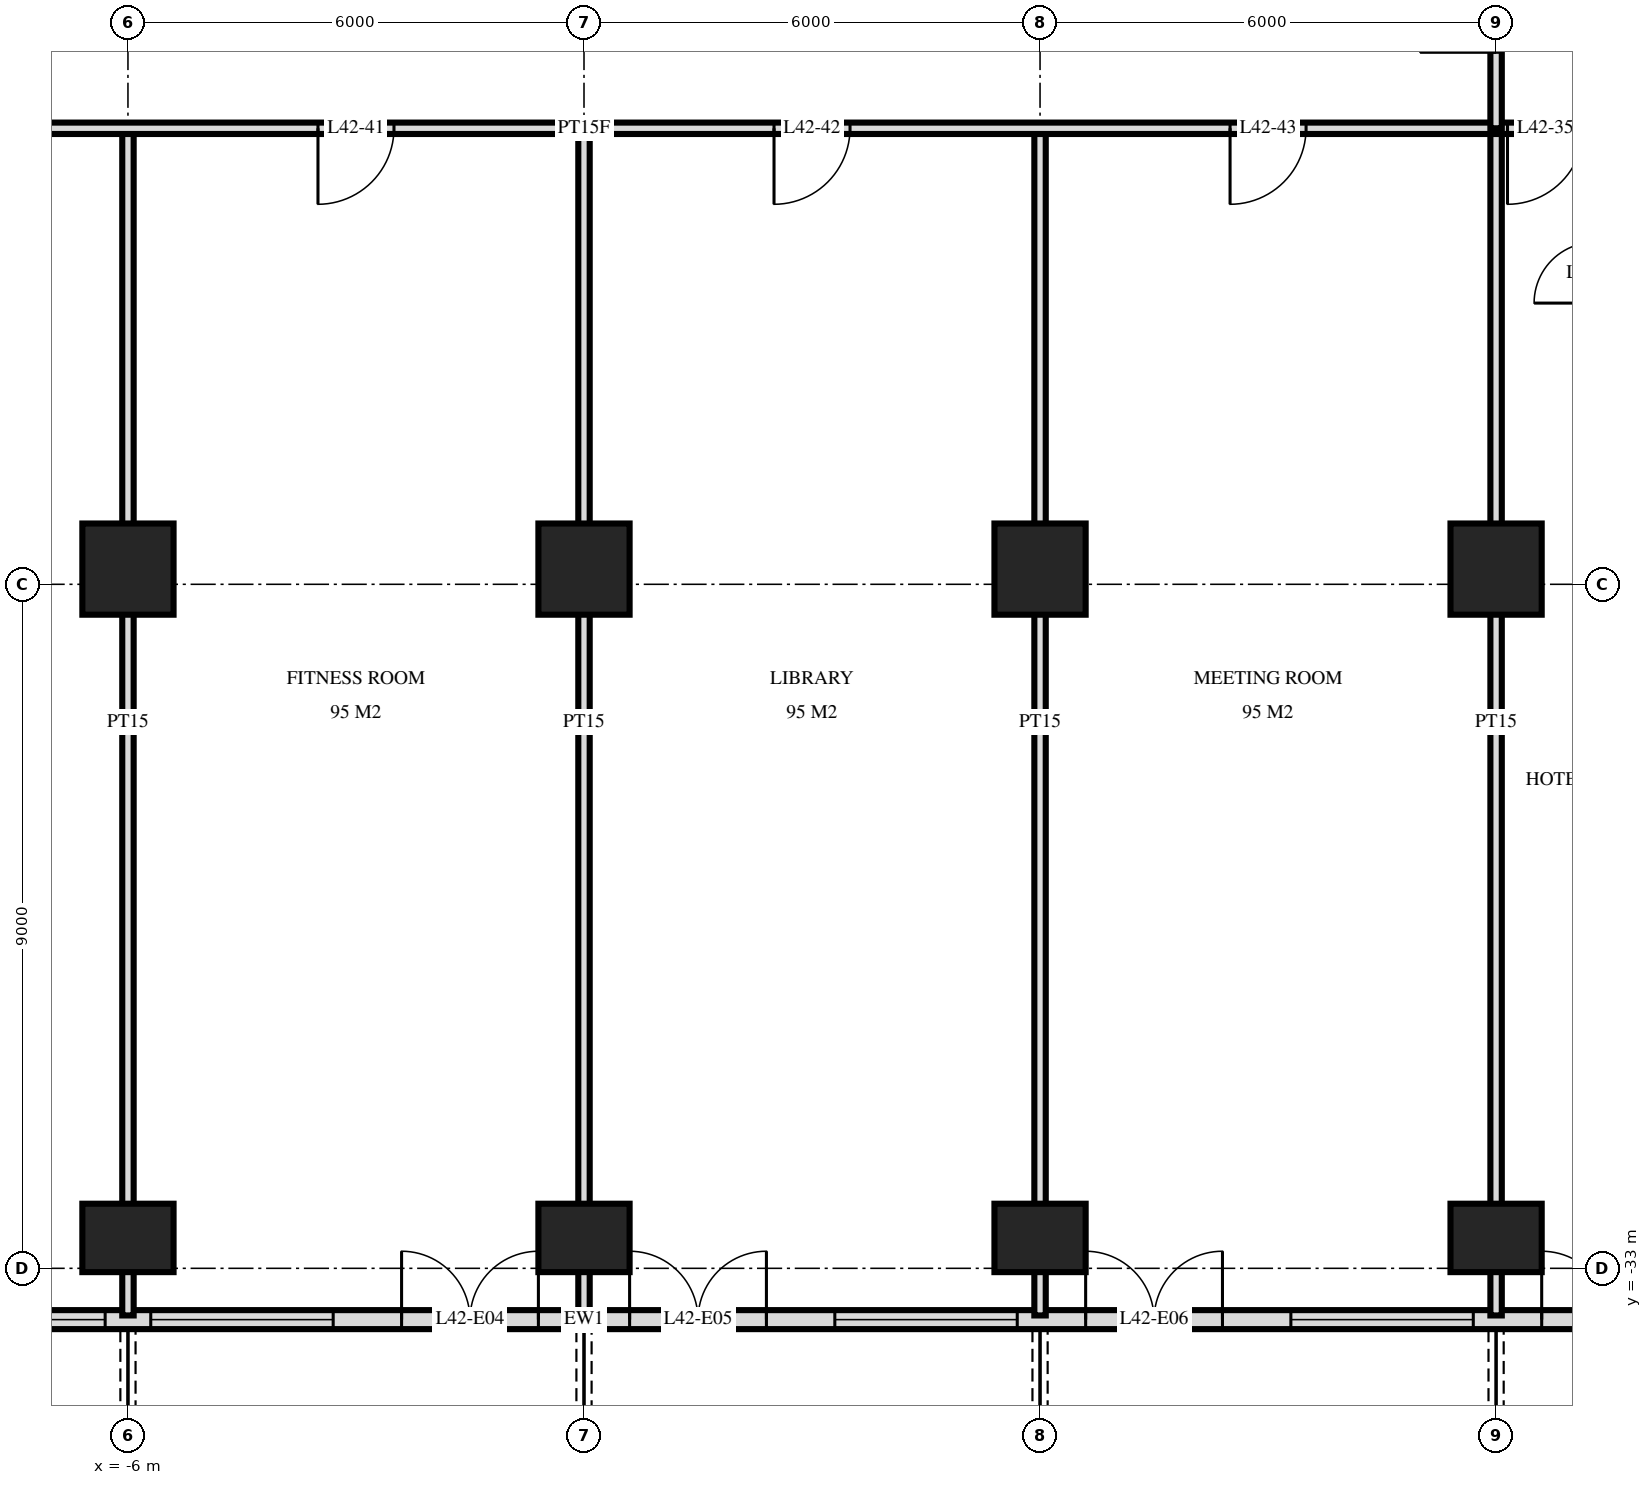
"""IFC4 building model, lengths in metres.
Left out: names, types, materials, properties, quantities, classifications, styles, units other than length and angle.
Written with IfcOpenShell. Run it as: python <this file> out.ifc"""

import sys

from ifc_helpers import new_model, si_unit, direction, frame, frame_2d, origin, origin_2d, place, context, subcontext, project, spatial, rectangle, extrude, element, fill, save


model = new_model("IFC4")
c1 = context("Model", 3, precision=1e-05, world=origin(), true_north=direction((0.0, 1.0)))
c2 = subcontext(c1, "Body", "Model", "MODEL_VIEW")
j1 = project(units=[si_unit("LENGTHUNIT", "METRE"), si_unit("PLANEANGLEUNIT", "RADIAN")], contexts=[c1])
p1 = place(None, origin())
s1 = spatial("IfcSite", under=j1, at=p1, CompositionType="ELEMENT")
p2 = place(p1, origin())
s2 = spatial("IfcBuilding", under=s1, at=p2, CompositionType="ELEMENT")
p3 = place(p2, frame((0.0, 0.0, 163.2)))
s3 = spatial("IfcBuildingStorey", under=s2, at=p3, CompositionType="ELEMENT", Elevation=163.2)
p4 = place(p3, frame((-6.0, -32.6, 0.0), z_axis=(0.0, 0.0, 1.0), x_axis=(1.0, 0.0, 0.0)))
e1 = element("IfcColumn", 1, at=p4, inside=s3, PredefinedType="COLUMN", context=c2, shape_type="SweptSolid", body=[
    extrude(rectangle(XDim=1.2, YDim=0.9, at=origin_2d()), origin(), (0.0, 0.0, 1.0), 3.6),
])
p5 = place(p3, frame((-6.0, -23.8, 0.0), z_axis=(0.0, 0.0, 1.0), x_axis=(1.0, 0.0, 0.0)))
e2 = element("IfcColumn", 2, at=p5, inside=s3, PredefinedType="COLUMN", context=c2, shape_type="SweptSolid", body=[
    extrude(rectangle(XDim=1.2, YDim=1.2, at=origin_2d()), origin(), (0.0, 0.0, 1.0), 3.6),
])
p6 = place(p3, frame((0.0, -32.6, 0.0), z_axis=(0.0, 0.0, 1.0), x_axis=(1.0, 0.0, 0.0)))
e3 = element("IfcColumn", 3, at=p6, inside=s3, PredefinedType="COLUMN", context=c2, shape_type="SweptSolid", body=[
    extrude(rectangle(XDim=1.2, YDim=0.9, at=origin_2d()), origin(), (0.0, 0.0, 1.0), 3.6),
])
p7 = place(p3, frame((0.0, -23.8, 0.0), z_axis=(0.0, 0.0, 1.0), x_axis=(1.0, 0.0, 0.0)))
e4 = element("IfcColumn", 4, at=p7, inside=s3, PredefinedType="COLUMN", context=c2, shape_type="SweptSolid", body=[
    extrude(rectangle(XDim=1.2, YDim=1.2, at=origin_2d()), origin(), (0.0, 0.0, 1.0), 3.6),
])
p8 = place(p3, frame((6.0, -32.6, 0.0), z_axis=(0.0, 0.0, 1.0), x_axis=(1.0, 0.0, 0.0)))
e5 = element("IfcColumn", 5, at=p8, inside=s3, PredefinedType="COLUMN", context=c2, shape_type="SweptSolid", body=[
    extrude(rectangle(XDim=1.2, YDim=0.9, at=origin_2d()), origin(), (0.0, 0.0, 1.0), 3.6),
])
p9 = place(p3, frame((6.0, -23.8, 0.0), z_axis=(0.0, 0.0, 1.0), x_axis=(1.0, 0.0, 0.0)))
e6 = element("IfcColumn", 6, at=p9, inside=s3, PredefinedType="COLUMN", context=c2, shape_type="SweptSolid", body=[
    extrude(rectangle(XDim=1.2, YDim=1.2, at=origin_2d()), origin(), (0.0, 0.0, 1.0), 3.6),
])
p10 = place(p3, frame((12.0, -32.6, 0.0), z_axis=(0.0, 0.0, 1.0), x_axis=(1.0, 0.0, 0.0)))
e7 = element("IfcColumn", 7, at=p10, inside=s3, PredefinedType="COLUMN", context=c2, shape_type="SweptSolid", body=[
    extrude(rectangle(XDim=1.2, YDim=0.9, at=origin_2d()), origin(), (0.0, 0.0, 1.0), 3.6),
])
p11 = place(p3, frame((12.0, -23.8, 0.0), z_axis=(0.0, 0.0, 1.0), x_axis=(1.0, 0.0, 0.0)))
e8 = element("IfcColumn", 8, at=p11, inside=s3, PredefinedType="COLUMN", context=c2, shape_type="SweptSolid", body=[
    extrude(rectangle(XDim=1.2, YDim=1.2, at=origin_2d()), origin(), (0.0, 0.0, 1.0), 3.6),
])
p12 = place(p3, frame((-23.675, -33.675, 0.0), z_axis=(0.0, 0.0, 1.0), x_axis=(1.0, 0.0, 0.0)))
e9 = element("IfcWall", 9, at=p12, inside=s3, PredefinedType="SOLIDWALL", context=c2, shape_type="SweptSolid", body=[
    extrude(rectangle(XDim=47.351, YDim=0.25, at=frame_2d((23.675, 0.0))), origin(), (0.0, 0.0, 1.0), 3.32),
])
p13 = place(p12, frame((0.575, 0.0, 0.0)))
e10 = element("IfcOpeningElement", 10, at=p13, cuts=e9, PredefinedType="OPENING", context=c2, shape_type="SweptSolid", body=[
    extrude(rectangle(XDim=1.8, YDim=2.4, at=frame_2d((0.9, 1.2))), frame((0.0, 0.135, 0.0), z_axis=(0.0, -1.0, 0.0), x_axis=(1.0, 0.0, 0.0)), (0.0, 0.0, 1.0), 0.27),
])
p14 = place(p12, frame((3.425, 0.0, 0.3)))
e11 = element("IfcOpeningElement", 11, at=p14, cuts=e9, PredefinedType="OPENING", context=c2, shape_type="SweptSolid", body=[
    extrude(rectangle(XDim=1.8, YDim=2.1, at=frame_2d((0.9, 1.05))), frame((0.0, 0.135, 0.0), z_axis=(0.0, -1.0, 0.0), x_axis=(1.0, 0.0, 0.0)), (0.0, 0.0, 1.0), 0.27),
])
p15 = place(p12, frame((5.975, 0.0, 0.3)))
e12 = element("IfcOpeningElement", 12, at=p15, cuts=e9, PredefinedType="OPENING", context=c2, shape_type="SweptSolid", body=[
    extrude(rectangle(XDim=2.4, YDim=2.1, at=frame_2d((1.2, 1.05))), frame((0.0, 0.135, 0.0), z_axis=(0.0, -1.0, 0.0), x_axis=(1.0, 0.0, 0.0)), (0.0, 0.0, 1.0), 0.27),
])
p16 = place(p12, frame((9.275, 0.0, 0.0)))
e13 = element("IfcOpeningElement", 13, at=p16, cuts=e9, PredefinedType="OPENING", context=c2, shape_type="SweptSolid", body=[
    extrude(rectangle(XDim=1.8, YDim=2.4, at=frame_2d((0.9, 1.2))), frame((0.0, 0.135, 0.0), z_axis=(0.0, -1.0, 0.0), x_axis=(1.0, 0.0, 0.0)), (0.0, 0.0, 1.0), 0.27),
])
p17 = place(p12, frame((12.275, 0.0, 0.0)))
e14 = element("IfcOpeningElement", 14, at=p17, cuts=e9, PredefinedType="OPENING", context=c2, shape_type="SweptSolid", body=[
    extrude(rectangle(XDim=1.8, YDim=2.4, at=frame_2d((0.9, 1.2))), frame((0.0, 0.135, 0.0), z_axis=(0.0, -1.0, 0.0), x_axis=(1.0, 0.0, 0.0)), (0.0, 0.0, 1.0), 0.27),
])
p18 = place(p12, frame((14.975, 0.0, 0.3)))
e15 = element("IfcOpeningElement", 15, at=p18, cuts=e9, PredefinedType="OPENING", context=c2, shape_type="SweptSolid", body=[
    extrude(rectangle(XDim=2.4, YDim=2.1, at=frame_2d((1.2, 1.05))), frame((0.0, 0.135, 0.0), z_axis=(0.0, -1.0, 0.0), x_axis=(1.0, 0.0, 0.0)), (0.0, 0.0, 1.0), 0.27),
])
p19 = place(p12, frame((17.975, 0.0, 0.3)))
e16 = element("IfcOpeningElement", 16, at=p19, cuts=e9, PredefinedType="OPENING", context=c2, shape_type="SweptSolid", body=[
    extrude(rectangle(XDim=2.4, YDim=2.1, at=frame_2d((1.2, 1.05))), frame((0.0, 0.135, 0.0), z_axis=(0.0, -1.0, 0.0), x_axis=(1.0, 0.0, 0.0)), (0.0, 0.0, 1.0), 0.27),
])
p20 = place(p12, frame((21.275, 0.0, 0.0)))
e17 = element("IfcOpeningElement", 17, at=p20, cuts=e9, PredefinedType="OPENING", context=c2, shape_type="SweptSolid", body=[
    extrude(rectangle(XDim=1.8, YDim=2.4, at=frame_2d((0.9, 1.2))), frame((0.0, 0.135, 0.0), z_axis=(0.0, -1.0, 0.0), x_axis=(1.0, 0.0, 0.0)), (0.0, 0.0, 1.0), 0.27),
])
p21 = place(p12, frame((24.275, 0.0, 0.0)))
e18 = element("IfcOpeningElement", 18, at=p21, cuts=e9, PredefinedType="OPENING", context=c2, shape_type="SweptSolid", body=[
    extrude(rectangle(XDim=1.8, YDim=2.4, at=frame_2d((0.9, 1.2))), frame((0.0, 0.135, 0.0), z_axis=(0.0, -1.0, 0.0), x_axis=(1.0, 0.0, 0.0)), (0.0, 0.0, 1.0), 0.27),
])
p22 = place(p12, frame((26.975, 0.0, 0.3)))
e19 = element("IfcOpeningElement", 19, at=p22, cuts=e9, PredefinedType="OPENING", context=c2, shape_type="SweptSolid", body=[
    extrude(rectangle(XDim=2.4, YDim=2.1, at=frame_2d((1.2, 1.05))), frame((0.0, 0.135, 0.0), z_axis=(0.0, -1.0, 0.0), x_axis=(1.0, 0.0, 0.0)), (0.0, 0.0, 1.0), 0.27),
])
p23 = place(p12, frame((30.275, 0.0, 0.0)))
e20 = element("IfcOpeningElement", 20, at=p23, cuts=e9, PredefinedType="OPENING", context=c2, shape_type="SweptSolid", body=[
    extrude(rectangle(XDim=1.8, YDim=2.4, at=frame_2d((0.9, 1.2))), frame((0.0, 0.135, 0.0), z_axis=(0.0, -1.0, 0.0), x_axis=(1.0, 0.0, 0.0)), (0.0, 0.0, 1.0), 0.27),
])
p24 = place(p12, frame((32.975, 0.0, 0.3)))
e21 = element("IfcOpeningElement", 21, at=p24, cuts=e9, PredefinedType="OPENING", context=c2, shape_type="SweptSolid", body=[
    extrude(rectangle(XDim=2.4, YDim=2.1, at=frame_2d((1.2, 1.05))), frame((0.0, 0.135, 0.0), z_axis=(0.0, -1.0, 0.0), x_axis=(1.0, 0.0, 0.0)), (0.0, 0.0, 1.0), 0.27),
])
p25 = place(p12, frame((36.275, 0.0, 0.0)))
e22 = element("IfcOpeningElement", 22, at=p25, cuts=e9, PredefinedType="OPENING", context=c2, shape_type="SweptSolid", body=[
    extrude(rectangle(XDim=1.8, YDim=2.4, at=frame_2d((0.9, 1.2))), frame((0.0, 0.135, 0.0), z_axis=(0.0, -1.0, 0.0), x_axis=(1.0, 0.0, 0.0)), (0.0, 0.0, 1.0), 0.27),
])
p26 = place(p12, frame((38.975, 0.0, 0.3)))
e23 = element("IfcOpeningElement", 23, at=p26, cuts=e9, PredefinedType="OPENING", context=c2, shape_type="SweptSolid", body=[
    extrude(rectangle(XDim=2.4, YDim=2.1, at=frame_2d((1.2, 1.05))), frame((0.0, 0.135, 0.0), z_axis=(0.0, -1.0, 0.0), x_axis=(1.0, 0.0, 0.0)), (0.0, 0.0, 1.0), 0.27),
])
p27 = place(p12, frame((41.975, 0.0, 0.3)))
e24 = element("IfcOpeningElement", 24, at=p27, cuts=e9, PredefinedType="OPENING", context=c2, shape_type="SweptSolid", body=[
    extrude(rectangle(XDim=2.4, YDim=2.1, at=frame_2d((1.2, 1.05))), frame((0.0, 0.135, 0.0), z_axis=(0.0, -1.0, 0.0), x_axis=(1.0, 0.0, 0.0)), (0.0, 0.0, 1.0), 0.27),
])
p28 = place(p12, frame((45.125, 0.0, 0.0)))
e25 = element("IfcOpeningElement", 25, at=p28, cuts=e9, PredefinedType="OPENING", context=c2, shape_type="SweptSolid", body=[
    extrude(rectangle(XDim=1.8, YDim=2.4, at=frame_2d((0.9, 1.2))), frame((0.0, 0.135, 0.0), z_axis=(0.0, -1.0, 0.0), x_axis=(1.0, 0.0, 0.0)), (0.0, 0.0, 1.0), 0.27),
])
p29 = place(p3, frame((12.0, -18.0, 0.0), z_axis=(0.0, 0.0, 1.0), x_axis=(0.0, 1.0, 0.0)))
e26 = element("IfcWall", 26, at=p29, inside=s3, PredefinedType="PARTITIONING", context=c2, shape_type="SweptSolid", body=[
    extrude(rectangle(XDim=2.95, YDim=0.15, at=frame_2d((1.475, 0.0))), origin(), (0.0, 0.0, 1.0), 3.32),
])
p30 = place(p29, frame((1.0, 0.0, 0.0)))
e27 = element("IfcOpeningElement", 27, at=p30, cuts=e26, PredefinedType="OPENING", context=c2, shape_type="SweptSolid", body=[
    extrude(rectangle(XDim=1.0, YDim=2.1, at=frame_2d((0.5, 1.05))), frame((0.0, 0.085, 0.0), z_axis=(0.0, -1.0, 0.0), x_axis=(1.0, 0.0, 0.0)), (0.0, 0.0, 1.0), 0.17),
])
for number, where, z_axis, x_axis in (
    (28, (12.0, -33.62, 0.0), (0.0, 0.0, 1.0), (0.0, 1.0, 0.0)),
    (29, (6.0, -33.62, 0.0), (0.0, 0.0, 1.0), (0.0, 1.0, 0.0)),
    (30, (0.0, -33.62, 0.0), (0.0, 0.0, 1.0), (0.0, 1.0, 0.0)),
    (31, (-6.0, -33.62, 0.0), (0.0, 0.0, 1.0), (0.0, 1.0, 0.0)),
):
    element("IfcWall", number, at=place(p3, frame(where, z_axis=z_axis, x_axis=x_axis)), inside=s3, PredefinedType="PARTITIONING", context=c2, shape_type="SweptSolid", body=[
        extrude(rectangle(XDim=15.62, YDim=0.15, at=frame_2d((7.81, 0.0))), origin(), (0.0, 0.0, 1.0), 3.32),
    ])
p31 = place(p3, frame((-28.02, -18.0, 0.0), z_axis=(0.0, 0.0, 1.0), x_axis=(1.0, 0.0, 0.0)))
e32 = element("IfcWall", 32, at=p31, inside=s3, PredefinedType="PARTITIONING", context=c2, shape_type="SweptSolid", body=[
    extrude(rectangle(XDim=56.04, YDim=0.15, at=frame_2d((28.02, 0.0))), origin(), (0.0, 0.0, 1.0), 3.32),
])
p32 = place(p31, frame((14.32, 0.0, 0.0)))
e33 = element("IfcOpeningElement", 33, at=p32, cuts=e32, PredefinedType="OPENING", context=c2, shape_type="SweptSolid", body=[
    extrude(rectangle(XDim=1.0, YDim=2.1, at=frame_2d((0.5, 1.05))), frame((0.0, 0.085, 0.0), z_axis=(0.0, -1.0, 0.0), x_axis=(1.0, 0.0, 0.0)), (0.0, 0.0, 1.0), 0.17),
])
p33 = place(p31, frame((40.17, 0.0, 0.0)))
e34 = element("IfcOpeningElement", 34, at=p33, cuts=e32, PredefinedType="OPENING", context=c2, shape_type="SweptSolid", body=[
    extrude(rectangle(XDim=1.0, YDim=2.1, at=frame_2d((0.5, 1.05))), frame((0.0, 0.085, 0.0), z_axis=(0.0, -1.0, 0.0), x_axis=(1.0, 0.0, 0.0)), (0.0, 0.0, 1.0), 0.17),
])
p34 = place(p31, frame((44.87, 0.0, 0.0)))
e35 = element("IfcOpeningElement", 35, at=p34, cuts=e32, PredefinedType="OPENING", context=c2, shape_type="SweptSolid", body=[
    extrude(rectangle(XDim=1.0, YDim=2.1, at=frame_2d((0.5, 1.05))), frame((0.0, 0.085, 0.0), z_axis=(0.0, -1.0, 0.0), x_axis=(1.0, 0.0, 0.0)), (0.0, 0.0, 1.0), 0.17),
])
p35 = place(p31, frame((46.72, 0.0, 0.0)))
e36 = element("IfcOpeningElement", 36, at=p35, cuts=e32, PredefinedType="OPENING", context=c2, shape_type="SweptSolid", body=[
    extrude(rectangle(XDim=1.0, YDim=2.1, at=frame_2d((0.5, 1.05))), frame((0.0, 0.085, 0.0), z_axis=(0.0, -1.0, 0.0), x_axis=(1.0, 0.0, 0.0)), (0.0, 0.0, 1.0), 0.17),
])
p36 = place(p31, frame((18.52, 0.0, 0.0)))
e37 = element("IfcOpeningElement", 37, at=p36, cuts=e32, PredefinedType="OPENING", context=c2, shape_type="SweptSolid", body=[
    extrude(rectangle(XDim=1.0, YDim=2.1, at=frame_2d((0.5, 1.05))), frame((0.0, 0.085, 0.0), z_axis=(0.0, -1.0, 0.0), x_axis=(1.0, 0.0, 0.0)), (0.0, 0.0, 1.0), 0.17),
])
p37 = place(p31, frame((24.52, 0.0, 0.0)))
e38 = element("IfcOpeningElement", 38, at=p37, cuts=e32, PredefinedType="OPENING", context=c2, shape_type="SweptSolid", body=[
    extrude(rectangle(XDim=1.0, YDim=2.1, at=frame_2d((0.5, 1.05))), frame((0.0, 0.085, 0.0), z_axis=(0.0, -1.0, 0.0), x_axis=(1.0, 0.0, 0.0)), (0.0, 0.0, 1.0), 0.17),
])
p38 = place(p31, frame((30.52, 0.0, 0.0)))
e39 = element("IfcOpeningElement", 39, at=p38, cuts=e32, PredefinedType="OPENING", context=c2, shape_type="SweptSolid", body=[
    extrude(rectangle(XDim=1.0, YDim=2.1, at=frame_2d((0.5, 1.05))), frame((0.0, 0.085, 0.0), z_axis=(0.0, -1.0, 0.0), x_axis=(1.0, 0.0, 0.0)), (0.0, 0.0, 1.0), 0.17),
])
p39 = place(p31, frame((36.52, 0.0, 0.0)))
e40 = element("IfcOpeningElement", 40, at=p39, cuts=e32, PredefinedType="OPENING", context=c2, shape_type="SweptSolid", body=[
    extrude(rectangle(XDim=1.0, YDim=2.1, at=frame_2d((0.5, 1.05))), frame((0.0, 0.085, 0.0), z_axis=(0.0, -1.0, 0.0), x_axis=(1.0, 0.0, 0.0)), (0.0, 0.0, 1.0), 0.17),
])
p40 = place(p18, origin())
e41 = element("IfcWindow", 41, at=p40, inside=s3, PartitioningType="SINGLE_PANEL", PredefinedType="WINDOW", context=c2, shape_type="SweptSolid", body=[
    extrude(rectangle(XDim=2.4, YDim=2.1, at=frame_2d((1.2, 1.05))), frame((0.0, 0.03, 0.0), z_axis=(0.0, -1.0, 0.0), x_axis=(1.0, 0.0, 0.0)), (0.0, 0.0, 1.0), 0.06),
])
fill(e15, e41)
p41 = place(p19, origin())
e42 = element("IfcWindow", 42, at=p41, inside=s3, PartitioningType="SINGLE_PANEL", PredefinedType="WINDOW", context=c2, shape_type="SweptSolid", body=[
    extrude(rectangle(XDim=2.4, YDim=2.1, at=frame_2d((1.2, 1.05))), frame((0.0, 0.03, 0.0), z_axis=(0.0, -1.0, 0.0), x_axis=(1.0, 0.0, 0.0)), (0.0, 0.0, 1.0), 0.06),
])
fill(e16, e42)
p42 = place(p20, origin())
e43 = element("IfcDoor", 43, at=p42, inside=s3, OperationType="DOUBLE_DOOR_SINGLE_SWING", PredefinedType="DOOR", context=c2, shape_type="SweptSolid", body=[
    extrude(rectangle(XDim=1.8, YDim=2.4, at=frame_2d((0.9, 1.2))), frame((0.0, 0.025, 0.0), z_axis=(0.0, -1.0, 0.0), x_axis=(1.0, 0.0, 0.0)), (0.0, 0.0, 1.0), 0.05),
])
fill(e17, e43)
p43 = place(p21, origin())
e44 = element("IfcDoor", 44, at=p43, inside=s3, OperationType="DOUBLE_DOOR_SINGLE_SWING", PredefinedType="DOOR", context=c2, shape_type="SweptSolid", body=[
    extrude(rectangle(XDim=1.8, YDim=2.4, at=frame_2d((0.9, 1.2))), frame((0.0, 0.025, 0.0), z_axis=(0.0, -1.0, 0.0), x_axis=(1.0, 0.0, 0.0)), (0.0, 0.0, 1.0), 0.05),
])
fill(e18, e44)
p44 = place(p22, origin())
e45 = element("IfcWindow", 45, at=p44, inside=s3, PartitioningType="SINGLE_PANEL", PredefinedType="WINDOW", context=c2, shape_type="SweptSolid", body=[
    extrude(rectangle(XDim=2.4, YDim=2.1, at=frame_2d((1.2, 1.05))), frame((0.0, 0.03, 0.0), z_axis=(0.0, -1.0, 0.0), x_axis=(1.0, 0.0, 0.0)), (0.0, 0.0, 1.0), 0.06),
])
fill(e19, e45)
p45 = place(p23, origin())
e46 = element("IfcDoor", 46, at=p45, inside=s3, OperationType="DOUBLE_DOOR_SINGLE_SWING", PredefinedType="DOOR", context=c2, shape_type="SweptSolid", body=[
    extrude(rectangle(XDim=1.8, YDim=2.4, at=frame_2d((0.9, 1.2))), frame((0.0, 0.025, 0.0), z_axis=(0.0, -1.0, 0.0), x_axis=(1.0, 0.0, 0.0)), (0.0, 0.0, 1.0), 0.05),
])
fill(e20, e46)
p46 = place(p24, origin())
e47 = element("IfcWindow", 47, at=p46, inside=s3, PartitioningType="SINGLE_PANEL", PredefinedType="WINDOW", context=c2, shape_type="SweptSolid", body=[
    extrude(rectangle(XDim=2.4, YDim=2.1, at=frame_2d((1.2, 1.05))), frame((0.0, 0.03, 0.0), z_axis=(0.0, -1.0, 0.0), x_axis=(1.0, 0.0, 0.0)), (0.0, 0.0, 1.0), 0.06),
])
fill(e21, e47)
p47 = place(p25, origin())
e48 = element("IfcDoor", 48, at=p47, inside=s3, OperationType="DOUBLE_DOOR_SINGLE_SWING", PredefinedType="DOOR", context=c2, shape_type="SweptSolid", body=[
    extrude(rectangle(XDim=1.8, YDim=2.4, at=frame_2d((0.9, 1.2))), frame((0.0, 0.025, 0.0), z_axis=(0.0, -1.0, 0.0), x_axis=(1.0, 0.0, 0.0)), (0.0, 0.0, 1.0), 0.05),
])
fill(e22, e48)
p48 = place(p33, frame((0.5, 0.0, 0.0), z_axis=(0.0, 0.0, 1.0), x_axis=(-1.0, 0.0, 0.0)))
e49 = element("IfcDoor", 49, at=p48, inside=s3, OperationType="SINGLE_SWING_LEFT", PredefinedType="DOOR", context=c2, shape_type="SweptSolid", body=[
    extrude(rectangle(XDim=1.0, YDim=2.1, at=frame_2d((0.0, 1.05))), frame((0.0, -0.025, 0.0), z_axis=(0.0, 1.0, 0.0), x_axis=(-1.0, 0.0, 0.0)), (0.0, 0.0, 1.0), 0.05),
])
fill(e34, e49)
p49 = place(p37, frame((0.5, 0.0, 0.0), z_axis=(0.0, 0.0, 1.0), x_axis=(-1.0, 0.0, 0.0)))
e50 = element("IfcDoor", 50, at=p49, inside=s3, OperationType="SINGLE_SWING_LEFT", PredefinedType="DOOR", context=c2, shape_type="SweptSolid", body=[
    extrude(rectangle(XDim=1.0, YDim=2.1, at=frame_2d((0.0, 1.05))), frame((0.0, -0.025, 0.0), z_axis=(0.0, 1.0, 0.0), x_axis=(-1.0, 0.0, 0.0)), (0.0, 0.0, 1.0), 0.05),
])
fill(e38, e50)
p50 = place(p38, frame((0.5, 0.0, 0.0), z_axis=(0.0, 0.0, 1.0), x_axis=(-1.0, 0.0, 0.0)))
e51 = element("IfcDoor", 51, at=p50, inside=s3, OperationType="SINGLE_SWING_LEFT", PredefinedType="DOOR", context=c2, shape_type="SweptSolid", body=[
    extrude(rectangle(XDim=1.0, YDim=2.1, at=frame_2d((0.0, 1.05))), frame((0.0, -0.025, 0.0), z_axis=(0.0, 1.0, 0.0), x_axis=(-1.0, 0.0, 0.0)), (0.0, 0.0, 1.0), 0.05),
])
fill(e39, e51)
p51 = place(p39, frame((0.5, 0.0, 0.0), z_axis=(0.0, 0.0, 1.0), x_axis=(-1.0, 0.0, 0.0)))
e52 = element("IfcDoor", 52, at=p51, inside=s3, OperationType="SINGLE_SWING_LEFT", PredefinedType="DOOR", context=c2, shape_type="SweptSolid", body=[
    extrude(rectangle(XDim=1.0, YDim=2.1, at=frame_2d((0.0, 1.05))), frame((0.0, -0.025, 0.0), z_axis=(0.0, 1.0, 0.0), x_axis=(-1.0, 0.0, 0.0)), (0.0, 0.0, 1.0), 0.05),
])
fill(e40, e52)
save(model, sys.argv[1])
